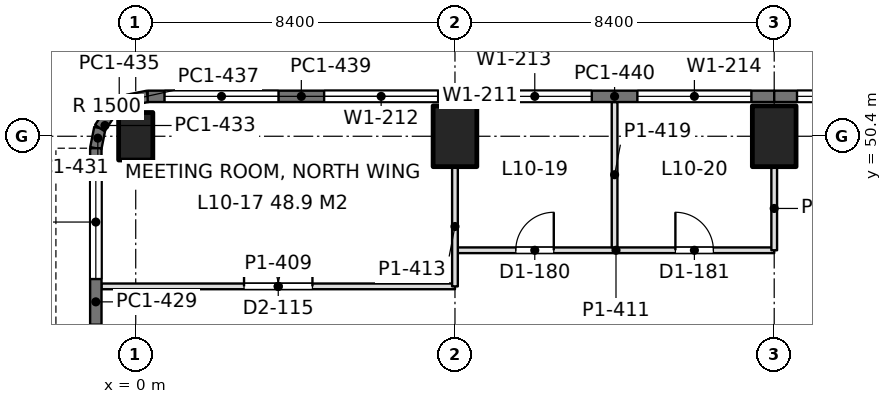
"""IFC4 building model, lengths in metres.
Left out: names, types, materials, properties, quantities, classifications, styles, units other than length and angle.
Written with IfcOpenShell. Run it as: python <this file> out.ifc"""

import sys

from ifc_helpers import new_model, si_unit, direction, frame, frame_2d, origin, origin_2d, place, context, subcontext, project, spatial, rectangle, extrude, element, fill, save


model = new_model("IFC4")
c1 = context("Model", 3, precision=1e-05, world=origin(), true_north=direction((0.0, 1.0)))
c2 = subcontext(c1, "Body", "Model", "MODEL_VIEW")
j1 = project(units=[si_unit("LENGTHUNIT", "METRE"), si_unit("PLANEANGLEUNIT", "RADIAN")], contexts=[c1])
p1 = place(None, origin())
s1 = spatial("IfcSite", under=j1, at=p1, CompositionType="ELEMENT")
p2 = place(p1, origin())
s2 = spatial("IfcBuilding", under=s1, at=p2, CompositionType="ELEMENT")
p3 = place(p2, frame((0.0, 0.0, 45.9)))
s3 = spatial("IfcBuildingStorey", under=s2, at=p3, CompositionType="ELEMENT", Elevation=45.9)
p4 = place(p3, frame((0.0, 50.4, 0.0), z_axis=(0.0, 0.0, 1.0), x_axis=(1.0, 0.0, 0.0)))
e1 = element("IfcColumn", 1, at=p4, inside=s3, PredefinedType="COLUMN", context=c2, shape_type="SweptSolid", body=[
    extrude(rectangle(XDim=0.9, YDim=1.25, at=origin_2d()), origin(), (0.0, 0.0, 1.0), 4.5),
])
for number, where, z_axis, x_axis in (
    (2, (8.4, 50.4, 0.0), (0.0, 0.0, 1.0), (1.0, 0.0, 0.0)),
    (3, (16.8, 50.4, 0.0), (0.0, 0.0, 1.0), (1.0, 0.0, 0.0)),
):
    element("IfcColumn", number, at=place(p3, frame(where, z_axis=z_axis, x_axis=x_axis)), inside=s3, PredefinedType="COLUMN", context=c2, shape_type="SweptSolid", body=[
        extrude(rectangle(XDim=1.15, YDim=1.6, at=origin_2d()), origin(), (0.0, 0.0, 1.0), 4.5),
    ])
p5 = place(p3, frame((-1.05, 42.0, 0.0), z_axis=(0.0, 0.0, 1.0), x_axis=(0.0, 1.0, 0.0)))
e4 = element("IfcWall", 4, at=p5, inside=s3, PredefinedType="SOLIDWALL", context=c2, shape_type="SweptSolid", body=[
    extrude(rectangle(XDim=8.085, YDim=0.3, at=frame_2d((4.042, 0.0))), origin(), (0.0, 0.0, 1.0), 4.34),
])
p6 = place(p5, frame((0.443, 0.0, 0.9)))
e5 = element("IfcOpeningElement", 5, at=p6, cuts=e4, PredefinedType="OPENING", context=c2, shape_type="SweptSolid", body=[
    extrude(rectangle(XDim=3.0, YDim=1.9, at=frame_2d((1.5, 0.95))), frame((0.0, 0.16, 0.0), z_axis=(0.0, -1.0, 0.0), x_axis=(1.0, 0.0, 0.0)), (0.0, 0.0, 1.0), 0.32),
])
p7 = place(p5, frame((4.643, 0.0, 0.9)))
e6 = element("IfcOpeningElement", 6, at=p7, cuts=e4, PredefinedType="OPENING", context=c2, shape_type="SweptSolid", body=[
    extrude(rectangle(XDim=3.0, YDim=1.9, at=frame_2d((1.5, 0.95))), frame((0.0, 0.16, 0.0), z_axis=(0.0, -1.0, 0.0), x_axis=(1.0, 0.0, 0.0)), (0.0, 0.0, 1.0), 0.32),
])
p8 = place(p3, frame((-1.05, 50.085, 0.0), z_axis=(0.0, 0.0, 1.0), x_axis=(0.195073962632, 0.980788534345, 0.0)))
e7 = element("IfcWall", 7, at=p8, inside=s3, PredefinedType="SOLIDWALL", context=c2, shape_type="SweptSolid", body=[
    extrude(rectangle(XDim=0.541, YDim=0.3, at=frame_2d((0.271, 0.0))), origin(), (0.0, 0.0, 1.0), 4.34),
])
for number, where, z_axis, x_axis in (
    (8, (-0.945, 50.615, 0.0), (0.0, 0.0, 1.0), (0.556, 0.831, 0.0)),
    (9, (-0.653, 51.052, 0.0), (0.0, 0.0, 1.0), (0.831, 0.556, 0.0)),
):
    element("IfcWall", number, at=place(p3, frame(where, z_axis=z_axis, x_axis=x_axis)), inside=s3, PredefinedType="SOLIDWALL", context=c2, shape_type="SweptSolid", body=[
        extrude(rectangle(XDim=0.526, YDim=0.3, at=frame_2d((0.263, 0.0))), origin(), (0.0, 0.0, 1.0), 4.34),
    ])
p9 = place(p3, frame((-0.216, 51.344, 0.0), z_axis=(0.0, 0.0, 1.0), x_axis=(0.980788534345, 0.195073962632, 0.0)))
e10 = element("IfcWall", 10, at=p9, inside=s3, PredefinedType="SOLIDWALL", context=c2, shape_type="SweptSolid", body=[
    extrude(rectangle(XDim=0.541, YDim=0.3, at=frame_2d((0.271, 0.0))), origin(), (0.0, 0.0, 1.0), 4.34),
])
p10 = place(p3, frame((0.315, 51.45, 0.0), z_axis=(0.0, 0.0, 1.0), x_axis=(1.0, 0.0, 0.0)))
e11 = element("IfcWall", 11, at=p10, inside=s3, PredefinedType="SOLIDWALL", context=c2, shape_type="SweptSolid", body=[
    extrude(rectangle(XDim=8.085, YDim=0.3, at=frame_2d((4.042, 0.0))), origin(), (0.0, 0.0, 1.0), 4.34),
])
p11 = place(p10, frame((0.443, 0.0, 0.9)))
e12 = element("IfcOpeningElement", 12, at=p11, cuts=e11, PredefinedType="OPENING", context=c2, shape_type="SweptSolid", body=[
    extrude(rectangle(XDim=3.0, YDim=1.9, at=frame_2d((1.5, 0.95))), frame((0.0, 0.16, 0.0), z_axis=(0.0, -1.0, 0.0), x_axis=(1.0, 0.0, 0.0)), (0.0, 0.0, 1.0), 0.32),
])
p12 = place(p10, frame((4.643, 0.0, 0.9)))
e13 = element("IfcOpeningElement", 13, at=p12, cuts=e11, PredefinedType="OPENING", context=c2, shape_type="SweptSolid", body=[
    extrude(rectangle(XDim=3.0, YDim=1.9, at=frame_2d((1.5, 0.95))), frame((0.0, 0.16, 0.0), z_axis=(0.0, -1.0, 0.0), x_axis=(1.0, 0.0, 0.0)), (0.0, 0.0, 1.0), 0.32),
])
p13 = place(p3, frame((8.4, 51.45, 0.0), z_axis=(0.0, 0.0, 1.0), x_axis=(1.0, 0.0, 0.0)))
e14 = element("IfcWall", 14, at=p13, inside=s3, PredefinedType="SOLIDWALL", context=c2, shape_type="SweptSolid", body=[
    extrude(rectangle(XDim=8.4, YDim=0.3, at=frame_2d((4.2, 0.0))), origin(), (0.0, 0.0, 1.0), 4.34),
])
p14 = place(p13, frame((0.6, 0.0, 0.9)))
e15 = element("IfcOpeningElement", 15, at=p14, cuts=e14, PredefinedType="OPENING", context=c2, shape_type="SweptSolid", body=[
    extrude(rectangle(XDim=3.0, YDim=1.9, at=frame_2d((1.5, 0.95))), frame((0.0, 0.16, 0.0), z_axis=(0.0, -1.0, 0.0), x_axis=(1.0, 0.0, 0.0)), (0.0, 0.0, 1.0), 0.32),
])
p15 = place(p13, frame((4.8, 0.0, 0.9)))
e16 = element("IfcOpeningElement", 16, at=p15, cuts=e14, PredefinedType="OPENING", context=c2, shape_type="SweptSolid", body=[
    extrude(rectangle(XDim=3.0, YDim=1.9, at=frame_2d((1.5, 0.95))), frame((0.0, 0.16, 0.0), z_axis=(0.0, -1.0, 0.0), x_axis=(1.0, 0.0, 0.0)), (0.0, 0.0, 1.0), 0.32),
])
p16 = place(p3, frame((16.8, 51.45, 0.0), z_axis=(0.0, 0.0, 1.0), x_axis=(1.0, 0.0, 0.0)))
e17 = element("IfcWall", 17, at=p16, inside=s3, PredefinedType="SOLIDWALL", context=c2, shape_type="SweptSolid", body=[
    extrude(rectangle(XDim=8.4, YDim=0.3, at=frame_2d((4.2, 0.0))), origin(), (0.0, 0.0, 1.0), 4.34),
])
p17 = place(p16, frame((0.6, 0.0, 0.9)))
e18 = element("IfcOpeningElement", 18, at=p17, cuts=e17, PredefinedType="OPENING", context=c2, shape_type="SweptSolid", body=[
    extrude(rectangle(XDim=3.0, YDim=1.9, at=frame_2d((1.5, 0.95))), frame((0.0, 0.16, 0.0), z_axis=(0.0, -1.0, 0.0), x_axis=(1.0, 0.0, 0.0)), (0.0, 0.0, 1.0), 0.32),
])
p18 = place(p16, frame((4.8, 0.0, 0.9)))
e19 = element("IfcOpeningElement", 19, at=p18, cuts=e17, PredefinedType="OPENING", context=c2, shape_type="SweptSolid", body=[
    extrude(rectangle(XDim=3.0, YDim=1.9, at=frame_2d((1.5, 0.95))), frame((0.0, 0.16, 0.0), z_axis=(0.0, -1.0, 0.0), x_axis=(1.0, 0.0, 0.0)), (0.0, 0.0, 1.0), 0.32),
])
p19 = place(p3, frame((-0.902, 46.45, 0.0), z_axis=(0.0, 0.0, 1.0), x_axis=(1.0, 0.0, 0.0)))
e20 = element("IfcWall", 20, at=p19, inside=s3, PredefinedType="PARTITIONING", context=c2, shape_type="SweptSolid", body=[
    extrude(rectangle(XDim=9.302, YDim=0.15, at=frame_2d((4.651, 0.0))), origin(), (0.0, 0.0, 1.0), 3.74),
])
p20 = place(p19, frame((3.752, 0.0, 0.0)))
e21 = element("IfcOpeningElement", 21, at=p20, cuts=e20, PredefinedType="OPENING", context=c2, shape_type="SweptSolid", body=[
    extrude(rectangle(XDim=1.8, YDim=2.2, at=frame_2d((0.9, 1.1))), frame((0.0, 0.085, 0.0), z_axis=(0.0, -1.0, 0.0), x_axis=(1.0, 0.0, 0.0)), (0.0, 0.0, 1.0), 0.17),
])
p21 = place(p3, frame((8.474, 47.4, 0.0), z_axis=(0.0, 0.0, 1.0), x_axis=(1.0, 0.0, 0.0)))
e22 = element("IfcWall", 22, at=p21, inside=s3, PredefinedType="PARTITIONING", context=c2, shape_type="SweptSolid", body=[
    extrude(rectangle(XDim=8.326, YDim=0.15, at=frame_2d((4.163, 0.0))), origin(), (0.0, 0.0, 1.0), 3.74),
])
p22 = place(p21, frame((1.526, 0.0, 0.0)))
e23 = element("IfcOpeningElement", 23, at=p22, cuts=e22, PredefinedType="OPENING", context=c2, shape_type="SweptSolid", body=[
    extrude(rectangle(XDim=1.0, YDim=2.2, at=frame_2d((0.5, 1.1))), frame((0.0, 0.085, 0.0), z_axis=(0.0, -1.0, 0.0), x_axis=(1.0, 0.0, 0.0)), (0.0, 0.0, 1.0), 0.17),
])
p23 = place(p21, frame((5.726, 0.0, 0.0)))
e24 = element("IfcOpeningElement", 24, at=p23, cuts=e22, PredefinedType="OPENING", context=c2, shape_type="SweptSolid", body=[
    extrude(rectangle(XDim=1.0, YDim=2.2, at=frame_2d((0.5, 1.1))), frame((0.0, 0.085, 0.0), z_axis=(0.0, -1.0, 0.0), x_axis=(1.0, 0.0, 0.0)), (0.0, 0.0, 1.0), 0.17),
])
p24 = place(p3, frame((8.4, 46.45, 0.0), z_axis=(0.0, 0.0, 1.0), x_axis=(0.0, 1.0, 0.0)))
e25 = element("IfcWall", 25, at=p24, inside=s3, PredefinedType="PARTITIONING", context=c2, shape_type="SweptSolid", body=[
    extrude(rectangle(XDim=3.151, YDim=0.15, at=frame_2d((1.576, 0.0))), origin(), (0.0, 0.0, 1.0), 3.74),
])
p25 = place(p3, frame((12.6, 47.474, 0.0), z_axis=(0.0, 0.0, 1.0), x_axis=(0.0, 1.0, 0.0)))
e26 = element("IfcWall", 26, at=p25, inside=s3, PredefinedType="PARTITIONING", context=c2, shape_type="SweptSolid", body=[
    extrude(rectangle(XDim=3.828, YDim=0.15, at=frame_2d((1.914, 0.0))), origin(), (0.0, 0.0, 1.0), 3.84),
])
p26 = place(p3, frame((16.8, 47.4, 0.0), z_axis=(0.0, 0.0, 1.0), x_axis=(0.0, 1.0, 0.0)))
e27 = element("IfcWall", 27, at=p26, inside=s3, PredefinedType="PARTITIONING", context=c2, shape_type="SweptSolid", body=[
    extrude(rectangle(XDim=2.201, YDim=0.15, at=frame_2d((1.101, 0.0))), origin(), (0.0, 0.0, 1.0), 3.74),
])
p27 = place(p7, origin())
e28 = element("IfcWindow", 28, at=p27, inside=s3, PartitioningType="SINGLE_PANEL", PredefinedType="WINDOW", context=c2, shape_type="SweptSolid", body=[
    extrude(rectangle(XDim=3.0, YDim=1.9, at=frame_2d((1.5, 0.95))), frame((0.0, 0.03, 0.0), z_axis=(0.0, -1.0, 0.0), x_axis=(1.0, 0.0, 0.0)), (0.0, 0.0, 1.0), 0.06),
])
fill(e6, e28)
p28 = place(p11, origin())
e29 = element("IfcWindow", 29, at=p28, inside=s3, PartitioningType="SINGLE_PANEL", PredefinedType="WINDOW", context=c2, shape_type="SweptSolid", body=[
    extrude(rectangle(XDim=3.0, YDim=1.9, at=frame_2d((1.5, 0.95))), frame((0.0, 0.03, 0.0), z_axis=(0.0, -1.0, 0.0), x_axis=(1.0, 0.0, 0.0)), (0.0, 0.0, 1.0), 0.06),
])
fill(e12, e29)
p29 = place(p12, origin())
e30 = element("IfcWindow", 30, at=p29, inside=s3, PartitioningType="SINGLE_PANEL", PredefinedType="WINDOW", context=c2, shape_type="SweptSolid", body=[
    extrude(rectangle(XDim=3.0, YDim=1.9, at=frame_2d((1.5, 0.95))), frame((0.0, 0.03, 0.0), z_axis=(0.0, -1.0, 0.0), x_axis=(1.0, 0.0, 0.0)), (0.0, 0.0, 1.0), 0.06),
])
fill(e13, e30)
p30 = place(p14, origin())
e31 = element("IfcWindow", 31, at=p30, inside=s3, PartitioningType="SINGLE_PANEL", PredefinedType="WINDOW", context=c2, shape_type="SweptSolid", body=[
    extrude(rectangle(XDim=3.0, YDim=1.9, at=frame_2d((1.5, 0.95))), frame((0.0, 0.03, 0.0), z_axis=(0.0, -1.0, 0.0), x_axis=(1.0, 0.0, 0.0)), (0.0, 0.0, 1.0), 0.06),
])
fill(e15, e31)
p31 = place(p15, origin())
e32 = element("IfcWindow", 32, at=p31, inside=s3, PartitioningType="SINGLE_PANEL", PredefinedType="WINDOW", context=c2, shape_type="SweptSolid", body=[
    extrude(rectangle(XDim=3.0, YDim=1.9, at=frame_2d((1.5, 0.95))), frame((0.0, 0.03, 0.0), z_axis=(0.0, -1.0, 0.0), x_axis=(1.0, 0.0, 0.0)), (0.0, 0.0, 1.0), 0.06),
])
fill(e16, e32)
p32 = place(p17, origin())
e33 = element("IfcWindow", 33, at=p32, inside=s3, PartitioningType="SINGLE_PANEL", PredefinedType="WINDOW", context=c2, shape_type="SweptSolid", body=[
    extrude(rectangle(XDim=3.0, YDim=1.9, at=frame_2d((1.5, 0.95))), frame((0.0, 0.03, 0.0), z_axis=(0.0, -1.0, 0.0), x_axis=(1.0, 0.0, 0.0)), (0.0, 0.0, 1.0), 0.06),
])
fill(e18, e33)
p33 = place(p20, origin())
e34 = element("IfcDoor", 34, at=p33, inside=s3, OperationType="DOUBLE_DOOR_SINGLE_SWING", PredefinedType="DOOR", context=c2, shape_type="SweptSolid", body=[
    extrude(rectangle(XDim=1.8, YDim=2.2, at=frame_2d((0.9, 1.1))), frame((0.0, 0.025, 0.0), z_axis=(0.0, -1.0, 0.0), x_axis=(1.0, 0.0, 0.0)), (0.0, 0.0, 1.0), 0.05),
])
fill(e21, e34)
p34 = place(p22, origin())
e35 = element("IfcDoor", 35, at=p34, inside=s3, OperationType="SINGLE_SWING_RIGHT", PredefinedType="DOOR", context=c2, shape_type="SweptSolid", body=[
    extrude(rectangle(XDim=1.0, YDim=2.2, at=frame_2d((0.5, 1.1))), frame((0.0, 0.025, 0.0), z_axis=(0.0, -1.0, 0.0), x_axis=(1.0, 0.0, 0.0)), (0.0, 0.0, 1.0), 0.05),
])
fill(e23, e35)
p35 = place(p23, origin())
e36 = element("IfcDoor", 36, at=p35, inside=s3, OperationType="SINGLE_SWING_LEFT", PredefinedType="DOOR", context=c2, shape_type="SweptSolid", body=[
    extrude(rectangle(XDim=1.0, YDim=2.2, at=frame_2d((0.5, 1.1))), frame((0.0, 0.025, 0.0), z_axis=(0.0, -1.0, 0.0), x_axis=(1.0, 0.0, 0.0)), (0.0, 0.0, 1.0), 0.05),
])
fill(e24, e36)
save(model, sys.argv[1])
